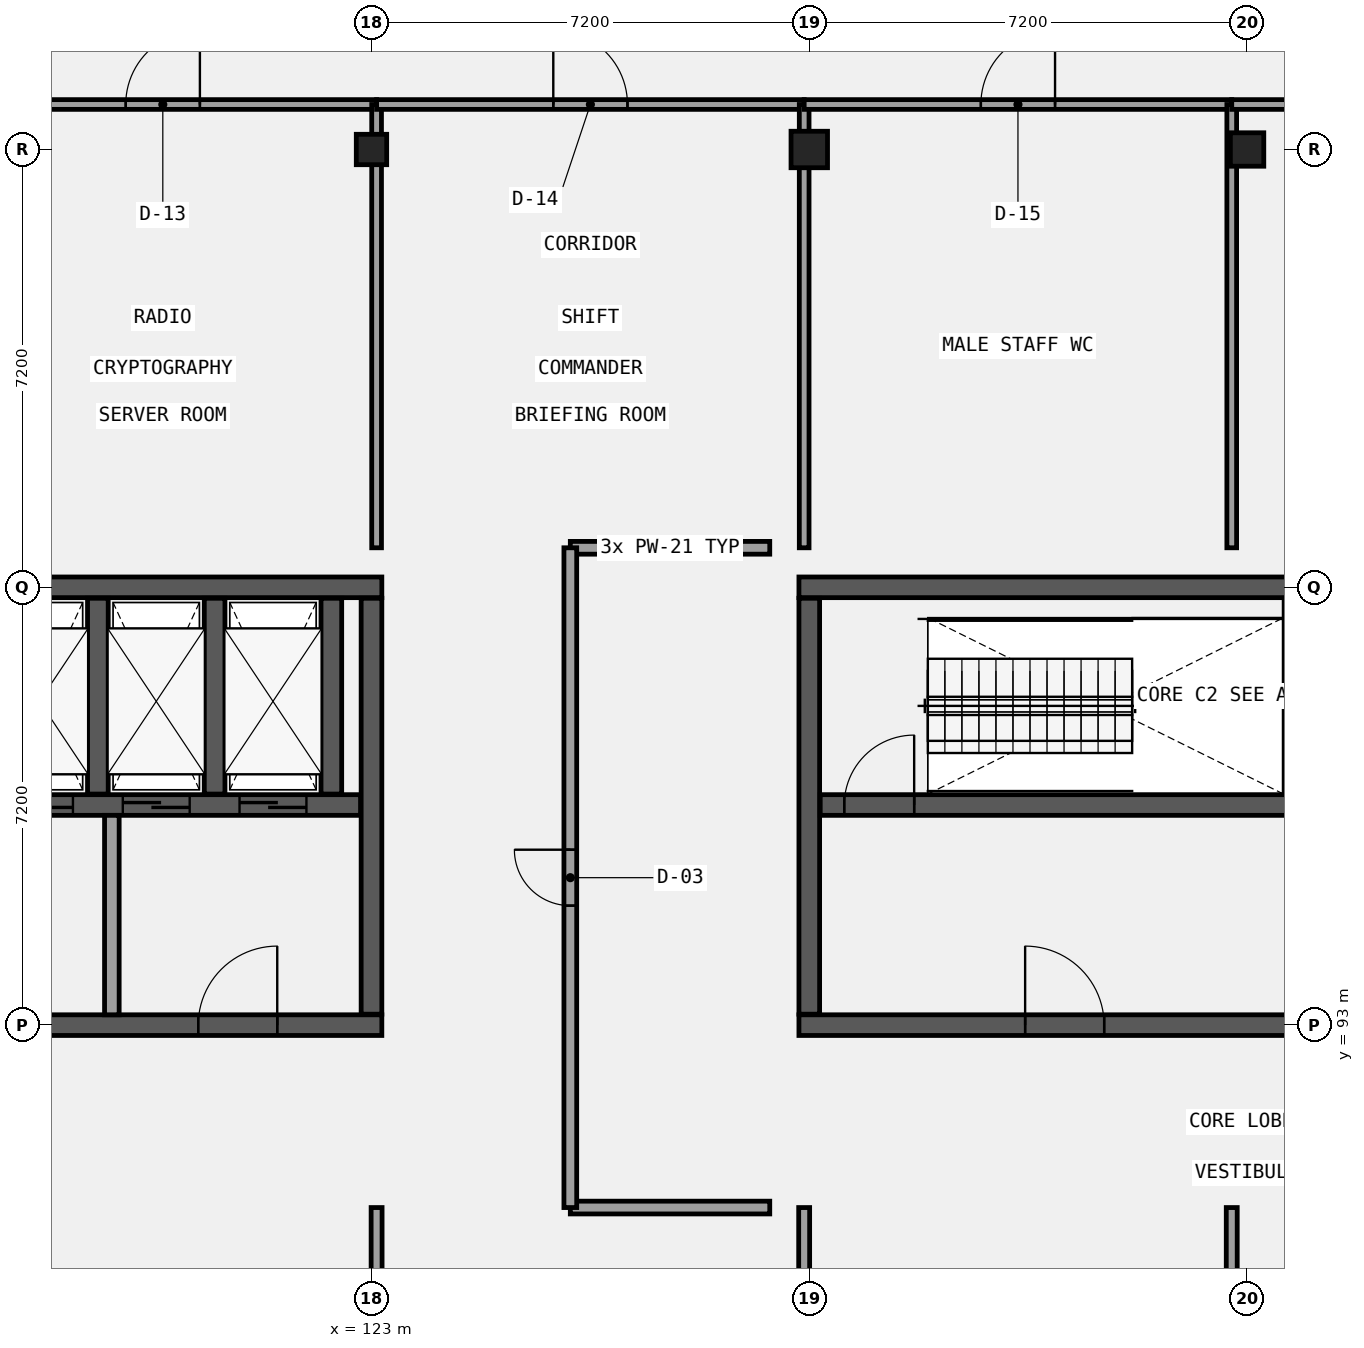
"""IFC4 building model, lengths in metres.
Left out: names, types, materials, properties, quantities, classifications, styles, units other than length and angle.
Written with IfcOpenShell. Run it as: python <this file> out.ifc"""

import sys

from ifc_helpers import new_model, si_unit, direction, frame, frame_2d, origin, origin_2d, place, context, subcontext, project, spatial, rectangle, extrude, element, fill, save


model = new_model("IFC4")
c1 = context("Model", 3, precision=1e-05, world=origin(), true_north=direction((0.0, 1.0)))
c2 = subcontext(c1, "Body", "Model", "MODEL_VIEW")
j1 = project(units=[si_unit("LENGTHUNIT", "METRE"), si_unit("PLANEANGLEUNIT", "RADIAN")], contexts=[c1])
p1 = place(None, origin())
s1 = spatial("IfcSite", under=j1, at=p1, CompositionType="ELEMENT")
p2 = place(p1, origin())
s2 = spatial("IfcBuilding", under=s1, at=p2, CompositionType="ELEMENT")
p3 = place(p2, frame((0.0, 0.0, 26.4)))
s3 = spatial("IfcBuildingStorey", under=s2, at=p3, CompositionType="ELEMENT", Elevation=26.4)
p4 = place(p3, frame((108.43, 100.2, 0.0), z_axis=(0.0, 0.0, 1.0), x_axis=(1.0, 0.0, 0.0)))
e1 = element("IfcWall", 1, at=p4, inside=s3, PredefinedType="SHEAR", context=c2, shape_type="SweptSolid", body=[
    extrude(rectangle(XDim=14.74, YDim=0.34, at=frame_2d((7.37, 0.0))), origin(), (0.0, 0.0, 1.0), 4.5),
])
p5 = place(p3, frame((108.43, 93.0, 0.0), z_axis=(0.0, 0.0, 1.0), x_axis=(1.0, 0.0, 0.0)))
e2 = element("IfcWall", 2, at=p5, inside=s3, PredefinedType="SHEAR", context=c2, shape_type="SweptSolid", body=[
    extrude(rectangle(XDim=14.74, YDim=0.34, at=frame_2d((7.37, 0.0))), origin(), (0.0, 0.0, 1.0), 4.5),
])
p6 = place(p5, frame((3.72, 0.0, 0.0)))
e3 = element("IfcOpeningElement", 3, at=p6, cuts=e2, PredefinedType="OPENING", context=c2, shape_type="SweptSolid", body=[
    extrude(rectangle(XDim=1.3, YDim=2.2, at=frame_2d((0.65, 1.1))), frame((0.0, 0.18, 0.0), z_axis=(0.0, -1.0, 0.0), x_axis=(1.0, 0.0, 0.0)), (0.0, 0.0, 1.0), 0.36),
])
p7 = place(p5, frame((11.72, 0.0, 0.0)))
e4 = element("IfcOpeningElement", 4, at=p7, cuts=e2, PredefinedType="OPENING", context=c2, shape_type="SweptSolid", body=[
    extrude(rectangle(XDim=1.3, YDim=2.2, at=frame_2d((0.65, 1.1))), frame((0.0, 0.18, 0.0), z_axis=(0.0, -1.0, 0.0), x_axis=(1.0, 0.0, 0.0)), (0.0, 0.0, 1.0), 0.36),
])
p8 = place(p3, frame((123.0, 93.18, 0.0), z_axis=(0.0, 0.0, 1.0), x_axis=(0.0, 1.0, 0.0)))
e5 = element("IfcWall", 5, at=p8, inside=s3, PredefinedType="SHEAR", context=c2, shape_type="SweptSolid", body=[
    extrude(rectangle(XDim=6.84, YDim=0.34, at=frame_2d((3.42, 0.0))), origin(), (0.0, 0.0, 1.0), 4.5),
])
p9 = place(p3, frame((108.78, 96.62, 0.0), z_axis=(0.0, 0.0, 1.0), x_axis=(1.0, 0.0, 0.0)))
e6 = element("IfcWall", 6, at=p9, inside=s3, PredefinedType="SHEAR", context=c2, shape_type="SweptSolid", body=[
    extrude(rectangle(XDim=14.04, YDim=0.34, at=frame_2d((7.02, 0.0))), origin(), (0.0, 0.0, 1.0), 4.5),
])
p10 = place(p9, frame((8.21, 0.0, 0.0)))
e7 = element("IfcOpeningElement", 7, at=p10, cuts=e6, PredefinedType="OPENING", context=c2, shape_type="SweptSolid", body=[
    extrude(rectangle(XDim=1.1, YDim=2.15, at=frame_2d((0.55, 1.075))), frame((0.0, 0.18, 0.0), z_axis=(0.0, -1.0, 0.0), x_axis=(1.0, 0.0, 0.0)), (0.0, 0.0, 1.0), 0.36),
])
p11 = place(p9, frame((10.13, 0.0, 0.0)))
e8 = element("IfcOpeningElement", 8, at=p11, cuts=e6, PredefinedType="OPENING", context=c2, shape_type="SweptSolid", body=[
    extrude(rectangle(XDim=1.1, YDim=2.15, at=frame_2d((0.55, 1.075))), frame((0.0, 0.18, 0.0), z_axis=(0.0, -1.0, 0.0), x_axis=(1.0, 0.0, 0.0)), (0.0, 0.0, 1.0), 0.36),
])
p12 = place(p9, frame((12.05, 0.0, 0.0)))
e9 = element("IfcOpeningElement", 9, at=p12, cuts=e6, PredefinedType="OPENING", context=c2, shape_type="SweptSolid", body=[
    extrude(rectangle(XDim=1.1, YDim=2.15, at=frame_2d((0.55, 1.075))), frame((0.0, 0.18, 0.0), z_axis=(0.0, -1.0, 0.0), x_axis=(1.0, 0.0, 0.0)), (0.0, 0.0, 1.0), 0.36),
])
p13 = place(p9, frame((0.395, 0.0, 0.0)))
e10 = element("IfcOpeningElement", 10, at=p13, cuts=e6, PredefinedType="OPENING", context=c2, shape_type="SweptSolid", body=[
    extrude(rectangle(XDim=1.15, YDim=2.15, at=frame_2d((0.575, 1.075))), frame((0.0, 0.18, 0.0), z_axis=(0.0, -1.0, 0.0), x_axis=(1.0, 0.0, 0.0)), (0.0, 0.0, 1.0), 0.36),
])
for number, where, z_axis, x_axis in (
    (11, (118.5, 96.8, 0.0), (0.0, 0.0, 1.0), (0.0, 1.0, 0.0)),
    (12, (120.42, 96.8, 0.0), (0.0, 0.0, 1.0), (0.0, 1.0, 0.0)),
    (13, (122.34, 96.8, 0.0), (0.0, 0.0, 1.0), (0.0, 1.0, 0.0)),
):
    element("IfcWall", number, at=place(p3, frame(where, z_axis=z_axis, x_axis=x_axis)), inside=s3, PredefinedType="SHEAR", context=c2, shape_type="SweptSolid", body=[
        extrude(rectangle(XDim=3.22, YDim=0.34, at=frame_2d((1.61, 0.0))), origin(), (0.0, 0.0, 1.0), 4.5),
    ])
p14 = place(p3, frame((130.03, 100.2, 0.0), z_axis=(0.0, 0.0, 1.0), x_axis=(1.0, 0.0, 0.0)))
e14 = element("IfcWall", 14, at=p14, inside=s3, PredefinedType="SHEAR", context=c2, shape_type="SweptSolid", body=[
    extrude(rectangle(XDim=14.74, YDim=0.34, at=frame_2d((7.37, 0.0))), origin(), (0.0, 0.0, 1.0), 4.5),
])
p15 = place(p3, frame((130.03, 93.0, 0.0), z_axis=(0.0, 0.0, 1.0), x_axis=(1.0, 0.0, 0.0)))
e15 = element("IfcWall", 15, at=p15, inside=s3, PredefinedType="SHEAR", context=c2, shape_type="SweptSolid", body=[
    extrude(rectangle(XDim=14.74, YDim=0.34, at=frame_2d((7.37, 0.0))), origin(), (0.0, 0.0, 1.0), 4.5),
])
p16 = place(p15, frame((3.72, 0.0, 0.0)))
e16 = element("IfcOpeningElement", 16, at=p16, cuts=e15, PredefinedType="OPENING", context=c2, shape_type="SweptSolid", body=[
    extrude(rectangle(XDim=1.3, YDim=2.2, at=frame_2d((0.65, 1.1))), frame((0.0, 0.18, 0.0), z_axis=(0.0, -1.0, 0.0), x_axis=(1.0, 0.0, 0.0)), (0.0, 0.0, 1.0), 0.36),
])
p17 = place(p15, frame((11.72, 0.0, 0.0)))
e17 = element("IfcOpeningElement", 17, at=p17, cuts=e15, PredefinedType="OPENING", context=c2, shape_type="SweptSolid", body=[
    extrude(rectangle(XDim=1.3, YDim=2.2, at=frame_2d((0.65, 1.1))), frame((0.0, 0.18, 0.0), z_axis=(0.0, -1.0, 0.0), x_axis=(1.0, 0.0, 0.0)), (0.0, 0.0, 1.0), 0.36),
])
p18 = place(p3, frame((130.2, 93.18, 0.0), z_axis=(0.0, 0.0, 1.0), x_axis=(0.0, 1.0, 0.0)))
e18 = element("IfcWall", 18, at=p18, inside=s3, PredefinedType="SHEAR", context=c2, shape_type="SweptSolid", body=[
    extrude(rectangle(XDim=6.84, YDim=0.34, at=frame_2d((3.42, 0.0))), origin(), (0.0, 0.0, 1.0), 4.5),
])
p19 = place(p3, frame((130.38, 96.62, 0.0), z_axis=(0.0, 0.0, 1.0), x_axis=(1.0, 0.0, 0.0)))
e19 = element("IfcWall", 19, at=p19, inside=s3, PredefinedType="SHEAR", context=c2, shape_type="SweptSolid", body=[
    extrude(rectangle(XDim=14.04, YDim=0.34, at=frame_2d((7.02, 0.0))), origin(), (0.0, 0.0, 1.0), 4.5),
])
p20 = place(p19, frame((8.21, 0.0, 0.0)))
e20 = element("IfcOpeningElement", 20, at=p20, cuts=e19, PredefinedType="OPENING", context=c2, shape_type="SweptSolid", body=[
    extrude(rectangle(XDim=1.1, YDim=2.15, at=frame_2d((0.55, 1.075))), frame((0.0, 0.18, 0.0), z_axis=(0.0, -1.0, 0.0), x_axis=(1.0, 0.0, 0.0)), (0.0, 0.0, 1.0), 0.36),
])
p21 = place(p19, frame((10.13, 0.0, 0.0)))
e21 = element("IfcOpeningElement", 21, at=p21, cuts=e19, PredefinedType="OPENING", context=c2, shape_type="SweptSolid", body=[
    extrude(rectangle(XDim=1.1, YDim=2.15, at=frame_2d((0.55, 1.075))), frame((0.0, 0.18, 0.0), z_axis=(0.0, -1.0, 0.0), x_axis=(1.0, 0.0, 0.0)), (0.0, 0.0, 1.0), 0.36),
])
p22 = place(p19, frame((12.05, 0.0, 0.0)))
e22 = element("IfcOpeningElement", 22, at=p22, cuts=e19, PredefinedType="OPENING", context=c2, shape_type="SweptSolid", body=[
    extrude(rectangle(XDim=1.1, YDim=2.15, at=frame_2d((0.55, 1.075))), frame((0.0, 0.18, 0.0), z_axis=(0.0, -1.0, 0.0), x_axis=(1.0, 0.0, 0.0)), (0.0, 0.0, 1.0), 0.36),
])
p23 = place(p19, frame((0.395, 0.0, 0.0)))
e23 = element("IfcOpeningElement", 23, at=p23, cuts=e19, PredefinedType="OPENING", context=c2, shape_type="SweptSolid", body=[
    extrude(rectangle(XDim=1.15, YDim=2.15, at=frame_2d((0.575, 1.075))), frame((0.0, 0.18, 0.0), z_axis=(0.0, -1.0, 0.0), x_axis=(1.0, 0.0, 0.0)), (0.0, 0.0, 1.0), 0.36),
])
p24 = place(p3, frame((123.0, 107.4, 0.0), z_axis=(0.0, 0.0, 1.0), x_axis=(1.0, 0.0, 0.0)))
e24 = element("IfcColumn", 24, at=p24, inside=s3, PredefinedType="COLUMN", context=c2, shape_type="SweptSolid", body=[
    extrude(rectangle(XDim=0.5, YDim=0.5, at=origin_2d()), origin(), (0.0, 0.0, 1.0), 4.5),
])
p25 = place(p3, frame((130.2, 107.4, 0.0), z_axis=(0.0, 0.0, 1.0), x_axis=(1.0, 0.0, 0.0)))
e25 = element("IfcColumn", 25, at=p25, inside=s3, PredefinedType="COLUMN", context=c2, shape_type="SweptSolid", body=[
    extrude(rectangle(XDim=0.6, YDim=0.6, at=origin_2d()), origin(), (0.0, 0.0, 1.0), 4.5),
])
p26 = place(p3, frame((137.4, 107.4, 0.0), z_axis=(0.0, 0.0, 1.0), x_axis=(1.0, 0.0, 0.0)))
e26 = element("IfcColumn", 26, at=p26, inside=s3, PredefinedType="COLUMN", context=c2, shape_type="SweptSolid", body=[
    extrude(rectangle(XDim=0.55, YDim=0.55, at=origin_2d()), origin(), (0.0, 0.0, 1.0), 4.5),
])
p27 = place(p3, frame((118.73, 93.17, 0.0), z_axis=(0.0, 0.0, 1.0), x_axis=(0.0, 1.0, 0.0)))
e27 = element("IfcWall", 27, at=p27, inside=s3, PredefinedType="SOLIDWALL", context=c2, shape_type="SweptSolid", body=[
    extrude(rectangle(XDim=3.28, YDim=0.24, at=frame_2d((1.64, 0.0))), origin(), (0.0, 0.0, 1.0), 4.19),
])
p28 = place(p3, frame((116.052, 108.14, 0.0), z_axis=(0.0, 0.0, 1.0), x_axis=(1.0, 0.0, 0.0)))
e28 = element("IfcWall", 28, at=p28, inside=s3, PredefinedType="PARTITIONING", context=c2, shape_type="SweptSolid", body=[
    extrude(rectangle(XDim=7.032, YDim=0.16, at=frame_2d((3.516, 0.0))), origin(), (0.0, 0.0, 1.0), 4.22),
])
p29 = place(p28, frame((2.906, 0.0, 0.0)))
e29 = element("IfcOpeningElement", 29, at=p29, cuts=e28, PredefinedType="OPENING", context=c2, shape_type="SweptSolid", body=[
    extrude(rectangle(XDim=1.22, YDim=2.1, at=frame_2d((0.61, 1.05))), frame((0.0, 0.09, 0.0), z_axis=(0.0, -1.0, 0.0), x_axis=(1.0, 0.0, 0.0)), (0.0, 0.0, 1.0), 0.18),
])
p30 = place(p3, frame((123.084, 100.85, 0.0), z_axis=(0.0, 0.0, 1.0), x_axis=(0.0, 1.0, 0.0)))
e30 = element("IfcWall", 30, at=p30, inside=s3, PredefinedType="PARTITIONING", context=c2, shape_type="SweptSolid", body=[
    extrude(rectangle(XDim=7.29, YDim=0.16, at=frame_2d((3.645, 0.0))), origin(), (0.0, 0.0, 1.0), 3.32),
])
p31 = place(p3, frame((123.084, 108.14, 0.0), z_axis=(0.0, 0.0, 1.0), x_axis=(1.0, 0.0, 0.0)))
e31 = element("IfcWall", 31, at=p31, inside=s3, PredefinedType="PARTITIONING", context=c2, shape_type="SweptSolid", body=[
    extrude(rectangle(XDim=7.032, YDim=0.16, at=frame_2d((3.516, 0.0))), origin(), (0.0, 0.0, 1.0), 4.22),
])
p32 = place(p31, frame((2.906, 0.0, 0.0)))
e32 = element("IfcOpeningElement", 32, at=p32, cuts=e31, PredefinedType="OPENING", context=c2, shape_type="SweptSolid", body=[
    extrude(rectangle(XDim=1.22, YDim=2.22, at=frame_2d((0.61, 1.11))), frame((0.0, 0.09, 0.0), z_axis=(0.0, -1.0, 0.0), x_axis=(1.0, 0.0, 0.0)), (0.0, 0.0, 1.0), 0.18),
])
p33 = place(p3, frame((130.116, 100.85, 0.0), z_axis=(0.0, 0.0, 1.0), x_axis=(0.0, 1.0, 0.0)))
e33 = element("IfcWall", 33, at=p33, inside=s3, PredefinedType="PARTITIONING", context=c2, shape_type="SweptSolid", body=[
    extrude(rectangle(XDim=7.29, YDim=0.16, at=frame_2d((3.645, 0.0))), origin(), (0.0, 0.0, 1.0), 3.22),
])
p34 = place(p3, frame((130.116, 108.14, 0.0), z_axis=(0.0, 0.0, 1.0), x_axis=(1.0, 0.0, 0.0)))
e34 = element("IfcWall", 34, at=p34, inside=s3, PredefinedType="PARTITIONING", context=c2, shape_type="SweptSolid", body=[
    extrude(rectangle(XDim=7.032, YDim=0.16, at=frame_2d((3.516, 0.0))), origin(), (0.0, 0.0, 1.0), 4.22),
])
p35 = place(p34, frame((2.906, 0.0, 0.0)))
e35 = element("IfcOpeningElement", 35, at=p35, cuts=e34, PredefinedType="OPENING", context=c2, shape_type="SweptSolid", body=[
    extrude(rectangle(XDim=1.22, YDim=2.35, at=frame_2d((0.61, 1.175))), frame((0.0, 0.09, 0.0), z_axis=(0.0, -1.0, 0.0), x_axis=(1.0, 0.0, 0.0)), (0.0, 0.0, 1.0), 0.18),
])
p36 = place(p3, frame((137.148, 100.85, 0.0), z_axis=(0.0, 0.0, 1.0), x_axis=(0.0, 1.0, 0.0)))
e36 = element("IfcWall", 36, at=p36, inside=s3, PredefinedType="PARTITIONING", context=c2, shape_type="SweptSolid", body=[
    extrude(rectangle(XDim=7.29, YDim=0.16, at=frame_2d((3.645, 0.0))), origin(), (0.0, 0.0, 1.0), 3.22),
])
p37 = place(p3, frame((137.148, 108.14, 0.0), z_axis=(0.0, 0.0, 1.0), x_axis=(1.0, 0.0, 0.0)))
e37 = element("IfcWall", 37, at=p37, inside=s3, PredefinedType="PARTITIONING", context=c2, shape_type="SweptSolid", body=[
    extrude(rectangle(XDim=7.032, YDim=0.16, at=frame_2d((3.516, 0.0))), origin(), (0.0, 0.0, 1.0), 4.22),
])
p38 = place(p37, frame((2.836, 0.0, 0.0)))
e38 = element("IfcOpeningElement", 38, at=p38, cuts=e37, PredefinedType="OPENING", context=c2, shape_type="SweptSolid", body=[
    extrude(rectangle(XDim=1.36, YDim=2.1, at=frame_2d((0.68, 1.05))), frame((0.0, 0.09, 0.0), z_axis=(0.0, -1.0, 0.0), x_axis=(1.0, 0.0, 0.0)), (0.0, 0.0, 1.0), 0.18),
])
p39 = place(p3, frame((123.084, 81.64, 0.0), z_axis=(0.0, 0.0, 1.0), x_axis=(0.0, 1.0, 0.0)))
e39 = element("IfcWall", 39, at=p39, inside=s3, PredefinedType="PARTITIONING", context=c2, shape_type="SweptSolid", body=[
    extrude(rectangle(XDim=8.36, YDim=0.18, at=frame_2d((4.18, 0.0))), origin(), (0.0, 0.0, 1.0), 3.47),
])
p40 = place(p3, frame((130.116, 81.64, 0.0), z_axis=(0.0, 0.0, 1.0), x_axis=(0.0, 1.0, 0.0)))
e40 = element("IfcWall", 40, at=p40, inside=s3, PredefinedType="PARTITIONING", context=c2, shape_type="SweptSolid", body=[
    extrude(rectangle(XDim=8.36, YDim=0.18, at=frame_2d((4.18, 0.0))), origin(), (0.0, 0.0, 1.0), 3.42),
])
p41 = place(p3, frame((137.148, 81.64, 0.0), z_axis=(0.0, 0.0, 1.0), x_axis=(0.0, 1.0, 0.0)))
e41 = element("IfcWall", 41, at=p41, inside=s3, PredefinedType="PARTITIONING", context=c2, shape_type="SweptSolid", body=[
    extrude(rectangle(XDim=8.36, YDim=0.18, at=frame_2d((4.18, 0.0))), origin(), (0.0, 0.0, 1.0), 3.37),
])
for number, where, z_axis, x_axis in (
    (42, (126.27, 90.0, 0.0), (0.0, 0.0, 1.0), (1.0, 0.0, 0.0)),
    (43, (126.27, 100.85, 0.0), (0.0, 0.0, 1.0), (1.0, 0.0, 0.0)),
):
    element("IfcWall", number, at=place(p3, frame(where, z_axis=z_axis, x_axis=x_axis)), inside=s3, PredefinedType="PARTITIONING", context=c2, shape_type="SweptSolid", body=[
        extrude(rectangle(XDim=3.28, YDim=0.21, at=frame_2d((1.64, 0.0))), origin(), (0.0, 0.0, 1.0), 4.22),
    ])
p42 = place(p3, frame((126.27, 90.0, 0.0), z_axis=(0.0, 0.0, 1.0), x_axis=(0.0, 1.0, 0.0)))
e44 = element("IfcWall", 44, at=p42, inside=s3, PredefinedType="PARTITIONING", context=c2, shape_type="SweptSolid", body=[
    extrude(rectangle(XDim=10.85, YDim=0.21, at=frame_2d((5.425, 0.0))), origin(), (0.0, 0.0, 1.0), 4.22),
])
p43 = place(p42, frame((4.965, 0.0, 0.0)))
e45 = element("IfcOpeningElement", 45, at=p43, cuts=e44, PredefinedType="OPENING", context=c2, shape_type="SweptSolid", body=[
    extrude(rectangle(XDim=0.92, YDim=2.35, at=frame_2d((0.46, 1.175))), frame((0.0, 0.115, 0.0), z_axis=(0.0, -1.0, 0.0), x_axis=(1.0, 0.0, 0.0)), (0.0, 0.0, 1.0), 0.23),
])
p44 = place(p10, frame((1.1, 0.0, 0.0), z_axis=(0.0, 0.0, 1.0), x_axis=(-1.0, 0.0, 0.0)))
e46 = element("IfcDoor", 46, at=p44, inside=s3, OperationType="DOUBLE_DOOR_SLIDING", PredefinedType="DOOR", context=c2, shape_type="SweptSolid", body=[
    extrude(rectangle(XDim=1.1, YDim=2.15, at=frame_2d((0.55, 1.075))), frame((0.0, 0.025, 0.0), z_axis=(0.0, -1.0, 0.0), x_axis=(1.0, 0.0, 0.0)), (0.0, 0.0, 1.0), 0.05),
])
fill(e7, e46)
p45 = place(p11, frame((1.1, 0.0, 0.0), z_axis=(0.0, 0.0, 1.0), x_axis=(-1.0, 0.0, 0.0)))
e47 = element("IfcDoor", 47, at=p45, inside=s3, OperationType="DOUBLE_DOOR_SLIDING", PredefinedType="DOOR", context=c2, shape_type="SweptSolid", body=[
    extrude(rectangle(XDim=1.1, YDim=2.15, at=frame_2d((0.55, 1.075))), frame((0.0, 0.025, 0.0), z_axis=(0.0, -1.0, 0.0), x_axis=(1.0, 0.0, 0.0)), (0.0, 0.0, 1.0), 0.05),
])
fill(e8, e47)
p46 = place(p12, frame((1.1, 0.0, 0.0), z_axis=(0.0, 0.0, 1.0), x_axis=(-1.0, 0.0, 0.0)))
e48 = element("IfcDoor", 48, at=p46, inside=s3, OperationType="DOUBLE_DOOR_SLIDING", PredefinedType="DOOR", context=c2, shape_type="SweptSolid", body=[
    extrude(rectangle(XDim=1.1, YDim=2.15, at=frame_2d((0.55, 1.075))), frame((0.0, 0.025, 0.0), z_axis=(0.0, -1.0, 0.0), x_axis=(1.0, 0.0, 0.0)), (0.0, 0.0, 1.0), 0.05),
])
fill(e9, e48)
p47 = place(p7, frame((1.3, 0.0, 0.0), z_axis=(0.0, 0.0, 1.0), x_axis=(-1.0, 0.0, 0.0)))
e49 = element("IfcDoor", 49, at=p47, inside=s3, OperationType="SINGLE_SWING_RIGHT", PredefinedType="DOOR", context=c2, shape_type="SweptSolid", body=[
    extrude(rectangle(XDim=1.3, YDim=2.2, at=frame_2d((0.65, 1.1))), frame((0.0, 0.025, 0.0), z_axis=(0.0, -1.0, 0.0), x_axis=(1.0, 0.0, 0.0)), (0.0, 0.0, 1.0), 0.05),
])
fill(e4, e49)
p48 = place(p23, origin())
e50 = element("IfcDoor", 50, at=p48, inside=s3, OperationType="SINGLE_SWING_RIGHT", PredefinedType="DOOR", context=c2, shape_type="SweptSolid", body=[
    extrude(rectangle(XDim=1.15, YDim=2.15, at=frame_2d((0.575, 1.075))), frame((0.0, 0.025, 0.0), z_axis=(0.0, -1.0, 0.0), x_axis=(1.0, 0.0, 0.0)), (0.0, 0.0, 1.0), 0.05),
])
fill(e23, e50)
p49 = place(p16, frame((1.3, 0.0, 0.0), z_axis=(0.0, 0.0, 1.0), x_axis=(-1.0, 0.0, 0.0)))
e51 = element("IfcDoor", 51, at=p49, inside=s3, OperationType="SINGLE_SWING_LEFT", PredefinedType="DOOR", context=c2, shape_type="SweptSolid", body=[
    extrude(rectangle(XDim=1.3, YDim=2.2, at=frame_2d((0.65, 1.1))), frame((0.0, 0.025, 0.0), z_axis=(0.0, -1.0, 0.0), x_axis=(1.0, 0.0, 0.0)), (0.0, 0.0, 1.0), 0.05),
])
fill(e16, e51)
p50 = place(p29, frame((1.22, 0.0, 0.0), z_axis=(0.0, 0.0, 1.0), x_axis=(-1.0, 0.0, 0.0)))
e52 = element("IfcDoor", 52, at=p50, inside=s3, OperationType="SINGLE_SWING_RIGHT", PredefinedType="DOOR", context=c2, shape_type="SweptSolid", body=[
    extrude(rectangle(XDim=1.22, YDim=2.1, at=frame_2d((0.61, 1.05))), frame((0.0, 0.025, 0.0), z_axis=(0.0, -1.0, 0.0), x_axis=(1.0, 0.0, 0.0)), (0.0, 0.0, 1.0), 0.05),
])
fill(e29, e52)
p51 = place(p32, frame((1.22, 0.0, 0.0), z_axis=(0.0, 0.0, 1.0), x_axis=(-1.0, 0.0, 0.0)))
e53 = element("IfcDoor", 53, at=p51, inside=s3, OperationType="SINGLE_SWING_LEFT", PredefinedType="DOOR", context=c2, shape_type="SweptSolid", body=[
    extrude(rectangle(XDim=1.22, YDim=2.22, at=frame_2d((0.61, 1.11))), frame((0.0, 0.025, 0.0), z_axis=(0.0, -1.0, 0.0), x_axis=(1.0, 0.0, 0.0)), (0.0, 0.0, 1.0), 0.05),
])
fill(e32, e53)
p52 = place(p35, frame((1.22, 0.0, 0.0), z_axis=(0.0, 0.0, 1.0), x_axis=(-1.0, 0.0, 0.0)))
e54 = element("IfcDoor", 54, at=p52, inside=s3, OperationType="SINGLE_SWING_RIGHT", PredefinedType="DOOR", context=c2, shape_type="SweptSolid", body=[
    extrude(rectangle(XDim=1.22, YDim=2.35, at=frame_2d((0.61, 1.175))), frame((0.0, 0.025, 0.0), z_axis=(0.0, -1.0, 0.0), x_axis=(1.0, 0.0, 0.0)), (0.0, 0.0, 1.0), 0.05),
])
fill(e35, e54)
p53 = place(p43, origin())
e55 = element("IfcDoor", 55, at=p53, inside=s3, OperationType="SINGLE_SWING_RIGHT", PredefinedType="DOOR", context=c2, shape_type="SweptSolid", body=[
    extrude(rectangle(XDim=0.92, YDim=2.35, at=frame_2d((0.46, 1.175))), frame((0.0, 0.025, 0.0), z_axis=(0.0, -1.0, 0.0), x_axis=(1.0, 0.0, 0.0)), (0.0, 0.0, 1.0), 0.05),
])
fill(e45, e55)
save(model, sys.argv[1])
